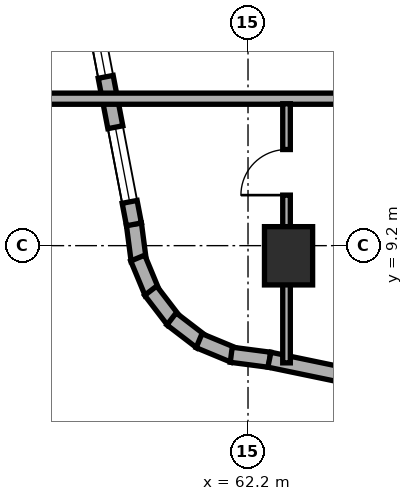
"""IFC4 building model, lengths in metres.
Left out: names, types, materials, properties, quantities, classifications, styles, units other than length and angle.
Written with IfcOpenShell. Run it as: python <this file> out.ifc"""

import sys

from ifc_helpers import new_model, si_unit, direction, frame, frame_2d, origin, origin_2d, place, context, subcontext, project, spatial, rectangle, extrude, element, fill, save


model = new_model("IFC4")
c1 = context("Model", 3, precision=1e-05, world=origin(), true_north=direction((0.0, 1.0)))
c2 = subcontext(c1, "Body", "Model", "MODEL_VIEW")
j1 = project(units=[si_unit("LENGTHUNIT", "METRE"), si_unit("PLANEANGLEUNIT", "RADIAN")], contexts=[c1])
p1 = place(None, origin())
s1 = spatial("IfcSite", under=j1, at=p1, CompositionType="ELEMENT")
p2 = place(p1, origin())
s2 = spatial("IfcBuilding", under=s1, at=p2, CompositionType="ELEMENT")
p3 = place(p2, frame((0.0, 0.0, 73.0)))
s3 = spatial("IfcBuildingStorey", under=s2, at=p3, CompositionType="ELEMENT", Elevation=73.0)
p4 = place(p3, frame((63.0, 9.0, 0.0), z_axis=(0.0, 0.0, 1.0), x_axis=(1.0, 0.0, 0.0)))
e1 = element("IfcColumn", 1, at=p4, inside=s3, PredefinedType="COLUMN", context=c2, shape_type="SweptSolid", body=[
    extrude(rectangle(XDim=0.95, YDim=1.15, at=origin_2d()), origin(), (0.0, 0.0, 1.0), 3.5),
])
p5 = place(p3, frame((59.948, 9.627, 0.0), z_axis=(0.0, 0.0, 1.0), x_axis=(0.130255288807, -0.991480488834, 0.0)))
e2 = element("IfcWall", 2, at=p5, inside=s3, PredefinedType="STANDARD", context=c2, shape_type="SweptSolid", body=[
    extrude(rectangle(XDim=0.729, YDim=0.3, at=frame_2d((0.365, 0.0))), origin(), (0.0, 0.0, 1.0), 3.25),
])
for number, where, z_axis, x_axis in (
    (3, (60.024, 8.955, 0.0), (0.0, 0.0, 1.0), (0.384, -0.924, 0.0)),
    (4, (60.279, 8.311, 0.0), (0.0, 0.0, 1.0), (0.608, -0.794, 0.0)),
    (5, (60.691, 7.754, 0.0), (0.0, 0.0, 1.0), (0.794, -0.608, 0.0)),
    (6, (61.234, 7.324, 0.0), (0.0, 0.0, 1.0), (0.924, -0.383, 0.0)),
):
    element("IfcWall", number, at=place(p3, frame(where, z_axis=z_axis, x_axis=x_axis)), inside=s3, PredefinedType="STANDARD", context=c2, shape_type="SweptSolid", body=[
        extrude(rectangle(XDim=0.746, YDim=0.3, at=frame_2d((0.373, 0.0))), origin(), (0.0, 0.0, 1.0), 3.25),
    ])
p6 = place(p3, frame((61.869, 7.047, 0.0), z_axis=(0.0, 0.0, 1.0), x_axis=(0.991559404866, -0.129653178221, 0.0)))
e7 = element("IfcWall", 7, at=p6, inside=s3, PredefinedType="STANDARD", context=c2, shape_type="SweptSolid", body=[
    extrude(rectangle(XDim=0.764, YDim=0.3, at=frame_2d((0.382, 0.0))), origin(), (0.0, 0.0, 1.0), 3.25),
])
p7 = place(p3, frame((62.622, 6.949, 0.0), z_axis=(0.0, 0.0, 1.0), x_axis=(0.979127260729, -0.203248142175, 0.0)))
e8 = element("IfcWall", 8, at=p7, inside=s3, PredefinedType="STANDARD", context=c2, shape_type="SweptSolid", body=[
    extrude(rectangle(XDim=8.92, YDim=0.3, at=frame_2d((4.46, 0.0))), origin(), (0.0, 0.0, 1.0), 3.25),
])
p8 = place(p7, frame((3.472, 0.0, 0.8)))
e9 = element("IfcOpeningElement", 9, at=p8, cuts=e8, PredefinedType="OPENING", context=c2, shape_type="SweptSolid", body=[
    extrude(rectangle(XDim=2.4, YDim=1.6, at=frame_2d((1.2, 0.8))), frame((0.0, 0.16, 0.0), z_axis=(0.0, -1.0, 0.0), x_axis=(1.0, 0.0, 0.0)), (0.0, 0.0, 1.0), 0.32),
])
p9 = place(p3, frame((58.137, 19.082, 0.0), z_axis=(0.0, 0.0, 1.0), x_axis=(0.188087874316, -0.982152203854, 0.0)))
e10 = element("IfcWall", 10, at=p9, inside=s3, PredefinedType="STANDARD", context=c2, shape_type="SweptSolid", body=[
    extrude(rectangle(XDim=9.634, YDim=0.3, at=frame_2d((4.817, 0.0))), origin(), (0.0, 0.0, 1.0), 3.25),
])
p10 = place(p9, frame((1.255, 0.0, 0.8)))
e11 = element("IfcOpeningElement", 11, at=p10, cuts=e10, PredefinedType="OPENING", context=c2, shape_type="SweptSolid", body=[
    extrude(rectangle(XDim=2.4, YDim=1.6, at=frame_2d((1.2, 0.8))), frame((0.0, 0.16, 0.0), z_axis=(0.0, -1.0, 0.0), x_axis=(1.0, 0.0, 0.0)), (0.0, 0.0, 1.0), 0.32),
])
p11 = place(p9, frame((5.47, 0.0, 0.85)))
e12 = element("IfcOpeningElement", 12, at=p11, cuts=e10, PredefinedType="OPENING", context=c2, shape_type="SweptSolid", body=[
    extrude(rectangle(XDim=1.2, YDim=1.5, at=frame_2d((0.6, 0.75))), frame((0.0, 0.16, 0.0), z_axis=(0.0, -1.0, 0.0), x_axis=(1.0, 0.0, 0.0)), (0.0, 0.0, 1.0), 0.32),
])
p12 = place(p9, frame((7.682, 0.0, 0.85)))
e13 = element("IfcOpeningElement", 13, at=p12, cuts=e10, PredefinedType="OPENING", context=c2, shape_type="SweptSolid", body=[
    extrude(rectangle(XDim=1.5, YDim=1.5, at=frame_2d((0.75, 0.75))), frame((0.0, 0.16, 0.0), z_axis=(0.0, -1.0, 0.0), x_axis=(1.0, 0.0, 0.0)), (0.0, 0.0, 1.0), 0.32),
])
p13 = place(p3, frame((58.16, 12.1, 0.0), z_axis=(0.0, 0.0, 1.0), x_axis=(1.0, 0.0, 0.0)))
e14 = element("IfcWall", 14, at=p13, inside=s3, PredefinedType="SOLIDWALL", context=c2, shape_type="SweptSolid", body=[
    extrude(rectangle(XDim=7.69, YDim=0.22, at=frame_2d((3.845, 0.0))), origin(), (0.0, 0.0, 1.0), 2.865),
])
p14 = place(p3, frame((62.96, 6.887, 0.0), z_axis=(0.0, 0.0, 1.0), x_axis=(0.0, 1.0, 0.0)))
e15 = element("IfcWall", 15, at=p14, inside=s3, PredefinedType="PARTITIONING", context=c2, shape_type="SweptSolid", body=[
    extrude(rectangle(XDim=5.113, YDim=0.15, at=frame_2d((2.557, 0.0))), origin(), (0.0, 0.0, 1.0), 2.865),
])
p15 = place(p14, frame((3.31, 0.0, 0.0)))
e16 = element("IfcOpeningElement", 16, at=p15, cuts=e15, PredefinedType="OPENING", context=c2, shape_type="SweptSolid", body=[
    extrude(rectangle(XDim=0.9, YDim=2.1, at=frame_2d((0.45, 1.05))), frame((0.0, 0.085, 0.0), z_axis=(0.0, -1.0, 0.0), x_axis=(1.0, 0.0, 0.0)), (0.0, 0.0, 1.0), 0.17),
])
p16 = place(p11, origin())
e17 = element("IfcWindow", 17, at=p16, inside=s3, PartitioningType="SINGLE_PANEL", PredefinedType="WINDOW", context=c2, shape_type="SweptSolid", body=[
    extrude(rectangle(XDim=1.2, YDim=1.5, at=frame_2d((0.6, 0.75))), frame((0.0, 0.03, 0.0), z_axis=(0.0, -1.0, 0.0), x_axis=(1.0, 0.0, 0.0)), (0.0, 0.0, 1.0), 0.06),
])
fill(e12, e17)
p17 = place(p12, origin())
e18 = element("IfcWindow", 18, at=p17, inside=s3, PartitioningType="SINGLE_PANEL", PredefinedType="WINDOW", context=c2, shape_type="SweptSolid", body=[
    extrude(rectangle(XDim=1.5, YDim=1.5, at=frame_2d((0.75, 0.75))), frame((0.0, 0.03, 0.0), z_axis=(0.0, -1.0, 0.0), x_axis=(1.0, 0.0, 0.0)), (0.0, 0.0, 1.0), 0.06),
])
fill(e13, e18)
p18 = place(p15, origin())
e19 = element("IfcDoor", 19, at=p18, inside=s3, OperationType="SINGLE_SWING_LEFT", PredefinedType="DOOR", context=c2, shape_type="SweptSolid", body=[
    extrude(rectangle(XDim=0.9, YDim=2.1, at=frame_2d((0.45, 1.05))), frame((0.0, 0.025, 0.0), z_axis=(0.0, -1.0, 0.0), x_axis=(1.0, 0.0, 0.0)), (0.0, 0.0, 1.0), 0.05),
])
fill(e16, e19)
save(model, sys.argv[1])
